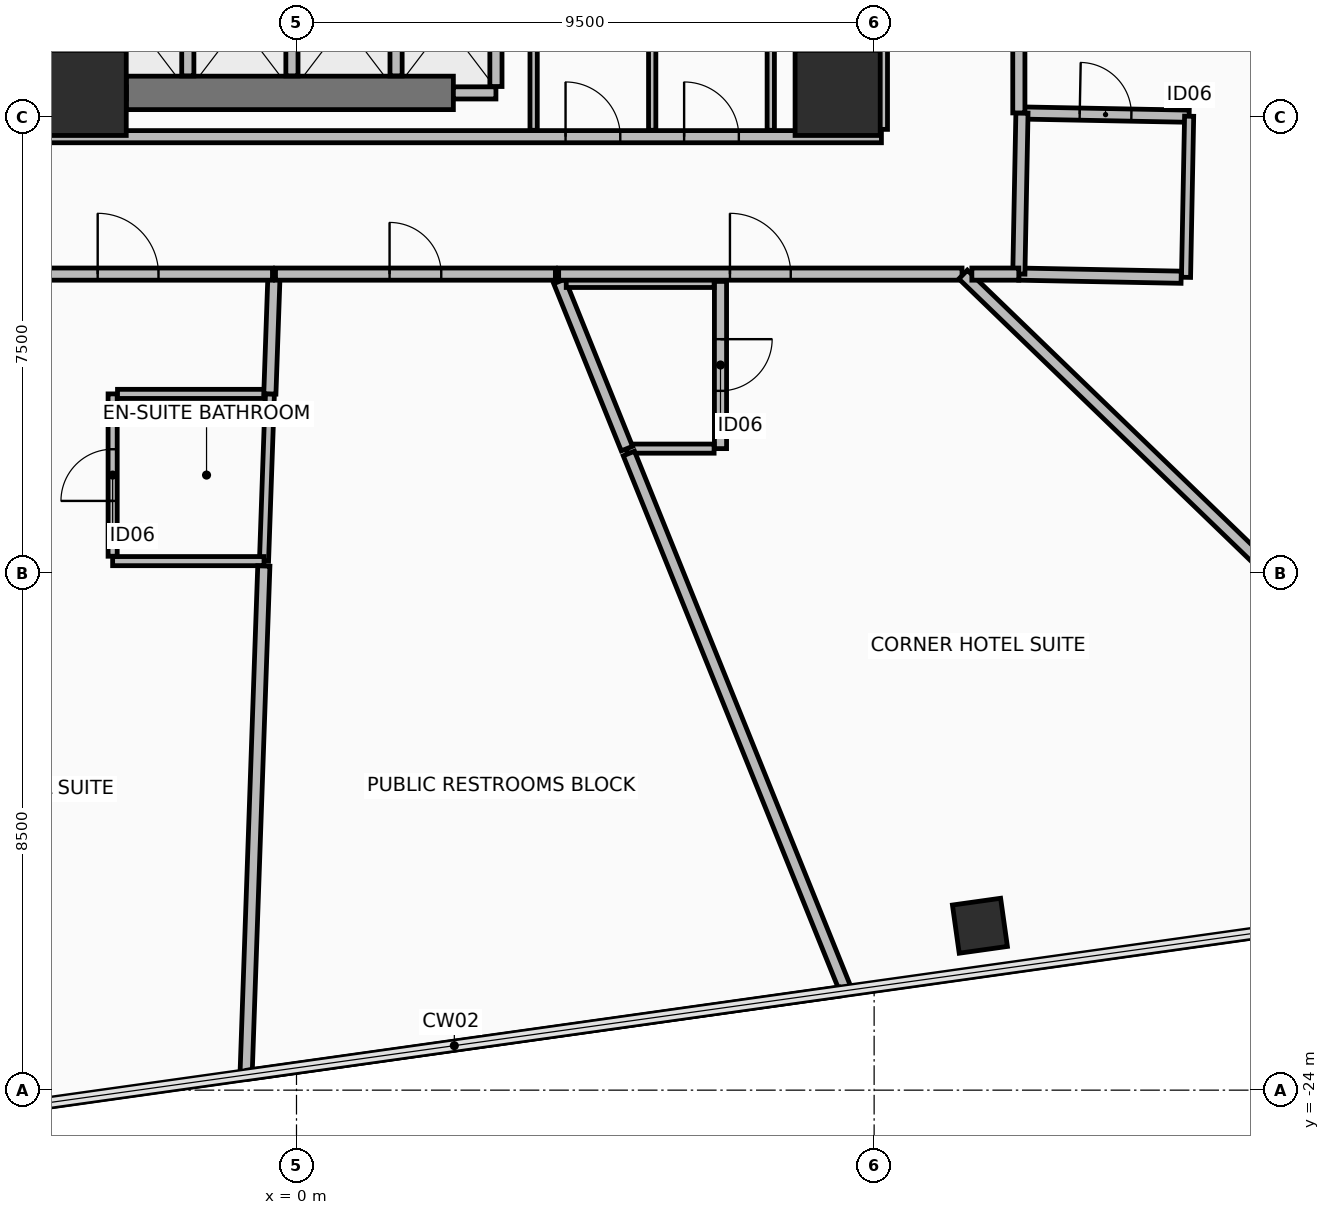
"""IFC4 building model, lengths in metres.
Left out: names, types, materials, properties, quantities, classifications, styles, units other than length and angle.
Written with IfcOpenShell. Run it as: python <this file> out.ifc"""

import sys

from ifc_helpers import new_model, si_unit, direction, frame, frame_2d, origin, origin_2d, place, context, subcontext, project, spatial, rectangle, hollow_rectangle, extrude, element, fill, save


model = new_model("IFC4")
c1 = context("Model", 3, precision=1e-05, world=origin(), true_north=direction((0.0, 1.0)))
c2 = subcontext(c1, "Body", "Model", "MODEL_VIEW")
j1 = project(units=[si_unit("LENGTHUNIT", "METRE"), si_unit("PLANEANGLEUNIT", "RADIAN")], contexts=[c1])
p1 = place(None, origin())
s1 = spatial("IfcSite", under=j1, at=p1, CompositionType="ELEMENT")
p2 = place(p1, origin())
s2 = spatial("IfcBuilding", under=s1, at=p2, CompositionType="ELEMENT")
p3 = place(p2, frame((0.0, 0.0, 70.75)))
s3 = spatial("IfcBuildingStorey", under=s2, at=p3, CompositionType="ELEMENT", Elevation=70.75)
for number, where, z_axis, x_axis in (
    (1, (-3.5, -7.6, 0.0), (0.0, 0.0, 1.0), (1.0, 0.0, 0.0)),
    (2, (8.9, -7.6, 0.0), (0.0, 0.0, 1.0), (1.0, 0.0, 0.0)),
):
    element("IfcColumn", number, at=place(p3, frame(where, z_axis=z_axis, x_axis=x_axis)), inside=s3, PredefinedType="COLUMN", context=c2, shape_type="SweptSolid", body=[
        extrude(rectangle(XDim=1.4, YDim=1.4, at=origin_2d()), origin(), (0.0, 0.0, 1.0), 3.45),
    ])
p4 = place(p3, frame((11.24, -21.296, 0.0), z_axis=(0.0, 0.0, 1.0), x_axis=(0.990268068742, 0.13917310096, 0.0)))
e3 = element("IfcColumn", 3, at=p4, inside=s3, PredefinedType="COLUMN", context=c2, shape_type="SweptSolid", body=[
    extrude(hollow_rectangle(XDim=0.8, YDim=0.8, WallThickness=0.045, at=origin_2d()), origin(), (0.0, 0.0, 1.0), 3.45),
])
p5 = place(p3, frame((-2.8, -7.6, 0.0), z_axis=(0.0, 0.0, 1.0), x_axis=(1.0, 0.0, 0.0)))
e4 = element("IfcWall", 4, at=p5, inside=s3, PredefinedType="SHEAR", context=c2, shape_type="SweptSolid", body=[
    extrude(rectangle(XDim=5.38, YDim=0.55, at=frame_2d((2.69, 0.0))), origin(), (0.0, 0.0, 1.0), 3.275),
])
p6 = place(p3, frame((-9.62, -8.32, 0.0), z_axis=(0.0, 0.0, 1.0), x_axis=(1.0, 0.0, 0.0)))
e5 = element("IfcWall", 5, at=p6, inside=s3, PredefinedType="PARTITIONING", context=c2, shape_type="SweptSolid", body=[
    extrude(rectangle(XDim=19.24, YDim=0.2, at=frame_2d((9.62, 0.0))), origin(), (0.0, 0.0, 1.0), 2.67),
])
p7 = place(p6, frame((14.045, 0.0, 0.0)))
e6 = element("IfcOpeningElement", 6, at=p7, cuts=e5, PredefinedType="OPENING", context=c2, shape_type="SweptSolid", body=[
    extrude(rectangle(XDim=0.9, YDim=2.1, at=frame_2d((0.45, 1.05))), frame((0.0, 0.11, 0.0), z_axis=(0.0, -1.0, 0.0), x_axis=(1.0, 0.0, 0.0)), (0.0, 0.0, 1.0), 0.22),
])
p8 = place(p6, frame((15.995, 0.0, 0.0)))
e7 = element("IfcOpeningElement", 7, at=p8, cuts=e5, PredefinedType="OPENING", context=c2, shape_type="SweptSolid", body=[
    extrude(rectangle(XDim=0.9, YDim=2.1, at=frame_2d((0.45, 1.05))), frame((0.0, 0.11, 0.0), z_axis=(0.0, -1.0, 0.0), x_axis=(1.0, 0.0, 0.0)), (0.0, 0.0, 1.0), 0.22),
])
p9 = place(p3, frame((9.62, -8.2, 0.0), z_axis=(0.0, 0.0, 1.0), x_axis=(0.0, 1.0, 0.0)))
e8 = element("IfcWall", 8, at=p9, inside=s3, PredefinedType="PARTITIONING", context=c2, shape_type="SweptSolid", body=[
    extrude(rectangle(XDim=16.4, YDim=0.2, at=frame_2d((8.2, 0.0))), origin(), (0.0, 0.0, 1.0), 2.67),
])
p10 = place(p9, frame((12.65, 0.0, 0.0)))
e9 = element("IfcOpeningElement", 9, at=p10, cuts=e8, PredefinedType="OPENING", context=c2, shape_type="SweptSolid", body=[
    extrude(rectangle(XDim=1.1, YDim=2.15, at=frame_2d((0.55, 1.075))), frame((0.0, 0.11, 0.0), z_axis=(0.0, -1.0, 0.0), x_axis=(1.0, 0.0, 0.0)), (0.0, 0.0, 1.0), 0.22),
])
p11 = place(p3, frame((-3.5, -7.6, 0.0), z_axis=(0.0, 0.0, 1.0), x_axis=(1.0, 0.0, 0.0)))
e10 = element("IfcWall", 10, at=p11, inside=s3, PredefinedType="PARTITIONING", context=c2, shape_type="SweptSolid", body=[
    extrude(rectangle(XDim=0.7, YDim=0.2, at=frame_2d((0.35, 0.0))), origin(), (0.0, 0.0, 1.0), 2.47),
])
p12 = place(p3, frame((-3.5, -7.495, 0.0), z_axis=(0.0, 0.0, 1.0), x_axis=(0.0, 1.0, 0.0)))
e11 = element("IfcWall", 11, at=p12, inside=s3, PredefinedType="PARTITIONING", context=c2, shape_type="SweptSolid", body=[
    extrude(rectangle(XDim=2.065, YDim=0.2, at=frame_2d((1.033, 0.0))), origin(), (0.0, 0.0, 1.0), 2.47),
])
for number, where, z_axis, x_axis in (
    (12, (-1.788, -7.32, 0.0), (0.0, 0.0, 1.0), (0.0, 1.0, 0.0)),
    (13, (-0.075, -7.32, 0.0), (0.0, 0.0, 1.0), (0.0, 1.0, 0.0)),
    (14, (1.637, -7.32, 0.0), (0.0, 0.0, 1.0), (0.0, 1.0, 0.0)),
):
    element("IfcWall", number, at=place(p3, frame(where, z_axis=z_axis, x_axis=x_axis)), inside=s3, PredefinedType="PARTITIONING", context=c2, shape_type="SweptSolid", body=[
        extrude(rectangle(XDim=1.89, YDim=0.2, at=frame_2d((0.945, 0.0))), origin(), (0.0, 0.0, 1.0), 3.275),
    ])
p13 = place(p3, frame((2.58, -7.6, 0.0), z_axis=(0.0, 0.0, 1.0), x_axis=(1.0, 0.0, 0.0)))
e15 = element("IfcWall", 15, at=p13, inside=s3, PredefinedType="PARTITIONING", context=c2, shape_type="SweptSolid", body=[
    extrude(rectangle(XDim=0.7, YDim=0.2, at=frame_2d((0.35, 0.0))), origin(), (0.0, 0.0, 1.0), 2.47),
])
p14 = place(p3, frame((3.28, -7.495, 0.0), z_axis=(0.0, 0.0, 1.0), x_axis=(0.0, 1.0, 0.0)))
e16 = element("IfcWall", 16, at=p14, inside=s3, PredefinedType="PARTITIONING", context=c2, shape_type="SweptSolid", body=[
    extrude(rectangle(XDim=2.065, YDim=0.2, at=frame_2d((1.033, 0.0))), origin(), (0.0, 0.0, 1.0), 2.47),
])
p15 = place(p3, frame((5.85, -8.215, 0.0), z_axis=(0.0, 0.0, 1.0), x_axis=(0.0, 1.0, 0.0)))
e17 = element("IfcWall", 17, at=p15, inside=s3, PredefinedType="PARTITIONING", context=c2, shape_type="SweptSolid", body=[
    extrude(rectangle(XDim=3.515, YDim=0.12, at=frame_2d((1.758, 0.0))), origin(), (0.0, 0.0, 1.0), 2.47),
])
p16 = place(p3, frame((3.9, -4.765, 0.0), z_axis=(0.0, 0.0, 1.0), x_axis=(0.0, -1.0, 0.0)))
e18 = element("IfcWall", 18, at=p16, inside=s3, PredefinedType="PARTITIONING", context=c2, shape_type="SweptSolid", body=[
    extrude(rectangle(XDim=3.45, YDim=0.12, at=frame_2d((1.725, 0.0))), origin(), (0.0, 0.0, 1.0), 2.47),
])
p17 = place(p3, frame((7.8, -8.215, 0.0), z_axis=(0.0, 0.0, 1.0), x_axis=(0.0, 1.0, 0.0)))
e19 = element("IfcWall", 19, at=p17, inside=s3, PredefinedType="PARTITIONING", context=c2, shape_type="SweptSolid", body=[
    extrude(rectangle(XDim=3.515, YDim=0.12, at=frame_2d((1.758, 0.0))), origin(), (0.0, 0.0, 1.0), 2.47),
])
p18 = place(p3, frame((-0.438, -12.55, 0.0), z_axis=(0.0, 0.0, 1.0), x_axis=(-0.034868698287, -0.999391902048, 0.0)))
e20 = element("IfcWall", 20, at=p18, inside=s3, PredefinedType="PARTITIONING", context=c2, shape_type="SweptSolid", body=[
    extrude(rectangle(XDim=2.752, YDim=0.15, at=frame_2d((1.376, 0.0))), origin(), (0.0, 0.0, 1.0), 3.275),
])
p19 = place(p3, frame((-0.534, -15.3, 0.0), z_axis=(0.0, 0.0, 1.0), x_axis=(-1.0, 0.0, 0.0)))
e21 = element("IfcWall", 21, at=p19, inside=s3, PredefinedType="PARTITIONING", context=c2, shape_type="SweptSolid", body=[
    extrude(rectangle(XDim=2.49, YDim=0.15, at=frame_2d((1.245, 0.0))), origin(), (0.0, 0.0, 1.0), 3.275),
])
p20 = place(p3, frame((-3.024, -15.22, 0.0), z_axis=(0.0, 0.0, 1.0), x_axis=(0.0, 1.0, 0.0)))
e22 = element("IfcWall", 22, at=p20, inside=s3, PredefinedType="PARTITIONING", context=c2, shape_type="SweptSolid", body=[
    extrude(rectangle(XDim=2.67, YDim=0.15, at=frame_2d((1.335, 0.0))), origin(), (0.0, 0.0, 1.0), 3.275),
])
p21 = place(p20, frame((0.91, 0.0, 0.0)))
e23 = element("IfcOpeningElement", 23, at=p21, cuts=e22, PredefinedType="OPENING", context=c2, shape_type="SweptSolid", body=[
    extrude(rectangle(XDim=0.85, YDim=2.1, at=frame_2d((0.425, 1.05))), frame((0.0, 0.085, 0.0), z_axis=(0.0, -1.0, 0.0), x_axis=(1.0, 0.0, 0.0)), (0.0, 0.0, 1.0), 0.17),
])
p22 = place(p3, frame((-2.944, -12.55, 0.0), z_axis=(0.0, 0.0, 1.0), x_axis=(1.0, 0.0, 0.0)))
e24 = element("IfcWall", 24, at=p22, inside=s3, PredefinedType="PARTITIONING", context=c2, shape_type="SweptSolid", body=[
    extrude(rectangle(XDim=2.425, YDim=0.15, at=frame_2d((1.213, 0.0))), origin(), (0.0, 0.0, 1.0), 3.275),
])
p23 = place(p3, frame((6.973, -10.7, 0.0), z_axis=(0.0, 0.0, 1.0), x_axis=(0.0, -1.0, 0.0)))
e25 = element("IfcWall", 25, at=p23, inside=s3, PredefinedType="PARTITIONING", context=c2, shape_type="SweptSolid", body=[
    extrude(rectangle(XDim=2.75, YDim=0.2, at=frame_2d((1.375, 0.0))), origin(), (0.0, 0.0, 1.0), 3.275),
])
p24 = place(p23, frame((0.95, 0.0, 0.0)))
e26 = element("IfcOpeningElement", 26, at=p24, cuts=e25, PredefinedType="OPENING", context=c2, shape_type="SweptSolid", body=[
    extrude(rectangle(XDim=0.85, YDim=2.1, at=frame_2d((0.425, 1.05))), frame((0.0, 0.11, 0.0), z_axis=(0.0, -1.0, 0.0), x_axis=(1.0, 0.0, 0.0)), (0.0, 0.0, 1.0), 0.22),
])
p25 = place(p3, frame((6.868, -13.45, 0.0), z_axis=(0.0, 0.0, 1.0), x_axis=(-1.0, 0.0, 0.0)))
e27 = element("IfcWall", 27, at=p25, inside=s3, PredefinedType="PARTITIONING", context=c2, shape_type="SweptSolid", body=[
    extrude(rectangle(XDim=1.434, YDim=0.15, at=frame_2d((0.717, 0.0))), origin(), (0.0, 0.0, 1.0), 3.275),
])
p26 = place(p3, frame((5.434, -13.45, 0.0), z_axis=(0.0, 0.0, 1.0), x_axis=(-0.374610031927, 0.927182465311, 0.0)))
e28 = element("IfcWall", 28, at=p26, inside=s3, PredefinedType="PARTITIONING", context=c2, shape_type="SweptSolid", body=[
    extrude(rectangle(XDim=2.966, YDim=0.2, at=frame_2d((1.483, 0.0))), origin(), (0.0, 0.0, 1.0), 3.275),
])
p27 = place(p3, frame((4.436, -10.7, 0.0), z_axis=(0.0, 0.0, 1.0), x_axis=(1.0, 0.0, 0.0)))
e29 = element("IfcWall", 29, at=p27, inside=s3, PredefinedType="PARTITIONING", context=c2, shape_type="SweptSolid", body=[
    extrude(rectangle(XDim=2.432, YDim=0.2, at=frame_2d((1.216, 0.0))), origin(), (0.0, 0.0, 1.0), 3.275),
])
p28 = place(p3, frame((11.931, -7.93, 0.0), z_axis=(0.0, 0.0, 1.0), x_axis=(0.999812703389, -0.019353504647, 0.0)))
e30 = element("IfcWall", 30, at=p28, inside=s3, PredefinedType="PARTITIONING", context=c2, shape_type="SweptSolid", body=[
    extrude(rectangle(XDim=2.75, YDim=0.2, at=frame_2d((1.375, 0.0))), origin(), (0.0, 0.0, 1.0), 3.275),
])
p29 = place(p28, frame((0.95, 0.0, 0.0)))
e31 = element("IfcOpeningElement", 31, at=p29, cuts=e30, PredefinedType="OPENING", context=c2, shape_type="SweptSolid", body=[
    extrude(rectangle(XDim=0.85, YDim=2.1, at=frame_2d((0.425, 1.05))), frame((0.0, 0.11, 0.0), z_axis=(0.0, -1.0, 0.0), x_axis=(1.0, 0.0, 0.0)), (0.0, 0.0, 1.0), 0.22),
])
p30 = place(p3, frame((14.681, -7.984, 0.0), z_axis=(0.0, 0.0, 1.0), x_axis=(-0.01934764942, -0.999812816712, 0.0)))
e32 = element("IfcWall", 32, at=p30, inside=s3, PredefinedType="PARTITIONING", context=c2, shape_type="SweptSolid", body=[
    extrude(rectangle(XDim=2.65, YDim=0.15, at=frame_2d((1.325, 0.0))), origin(), (0.0, 0.0, 1.0), 2.67),
])
p31 = place(p3, frame((14.55, -10.632, 0.0), z_axis=(0.0, 0.0, 1.0), x_axis=(-0.999813887268, 0.019292247848, 0.0)))
e33 = element("IfcWall", 33, at=p31, inside=s3, PredefinedType="PARTITIONING", context=c2, shape_type="SweptSolid", body=[
    extrude(rectangle(XDim=2.67, YDim=0.2, at=frame_2d((1.335, 0.0))), origin(), (0.0, 0.0, 1.0), 2.67),
])
p32 = place(p3, frame((11.88, -10.579, 0.0), z_axis=(0.0, 0.0, 1.0), x_axis=(0.019356564513, 0.999812644154, 0.0)))
e34 = element("IfcWall", 34, at=p32, inside=s3, PredefinedType="PARTITIONING", context=c2, shape_type="SweptSolid", body=[
    extrude(rectangle(XDim=2.649, YDim=0.2, at=frame_2d((1.324, 0.0))), origin(), (0.0, 0.0, 1.0), 2.67),
])
p33 = place(p3, frame((-0.828, -23.72, 0.0), z_axis=(0.0, 0.0, 1.0), x_axis=(0.034900568233, 0.9993907896, 0.0)))
e35 = element("IfcWall", 35, at=p33, inside=s3, PredefinedType="PARTITIONING", context=c2, shape_type="SweptSolid", body=[
    extrude(rectangle(XDim=8.345, YDim=0.2, at=frame_2d((4.173, 0.0))), origin(), (0.0, 0.0, 1.0), 2.47),
])
p34 = place(p3, frame((-0.438, -12.55, 0.0), z_axis=(0.0, 0.0, 1.0), x_axis=(0.034855235143, 0.999392371685, 0.0)))
e36 = element("IfcWall", 36, at=p34, inside=s3, PredefinedType="PARTITIONING", context=c2, shape_type="SweptSolid", body=[
    extrude(rectangle(XDim=1.947, YDim=0.2, at=frame_2d((0.974, 0.0))), origin(), (0.0, 0.0, 1.0), 3.275),
])
p35 = place(p3, frame((-0.345, -10.58, 0.0), z_axis=(0.0, 0.0, 1.0), x_axis=(1.0, 0.0, 0.0)))
e37 = element("IfcWall", 37, at=p35, inside=s3, PredefinedType="PARTITIONING", context=c2, shape_type="SweptSolid", body=[
    extrude(rectangle(XDim=4.603, YDim=0.2, at=frame_2d((2.302, 0.0))), origin(), (0.0, 0.0, 1.0), 3.275),
])
p36 = place(p35, frame((1.876, 0.0, 0.0)))
e38 = element("IfcOpeningElement", 38, at=p36, cuts=e37, PredefinedType="OPENING", context=c2, shape_type="SweptSolid", body=[
    extrude(rectangle(XDim=0.85, YDim=2.1, at=frame_2d((0.425, 1.05))), frame((0.0, 0.11, 0.0), z_axis=(0.0, -1.0, 0.0), x_axis=(1.0, 0.0, 0.0)), (0.0, 0.0, 1.0), 0.22),
])
p37 = place(p3, frame((5.467, -13.53, 0.0), z_axis=(0.0, 0.0, 1.0), x_axis=(0.374604987926, -0.927184503225, 0.0)))
e39 = element("IfcWall", 39, at=p37, inside=s3, PredefinedType="PARTITIONING", context=c2, shape_type="SweptSolid", body=[
    extrude(rectangle(XDim=9.527, YDim=0.2, at=frame_2d((4.763, 0.0))), origin(), (0.0, 0.0, 1.0), 2.47),
])
p38 = place(p3, frame((8.928, -22.378, 0.0), z_axis=(0.0, 0.0, 1.0), x_axis=(-0.990268034831, -0.139173342244, 0.0)))
e40 = element("IfcWall", 40, at=p38, inside=s3, PredefinedType="PARTITIONING", context=c2, shape_type="SweptSolid", body=[
    extrude(rectangle(XDim=9.824, YDim=0.15, at=frame_2d((4.912, 0.0))), origin(), (0.0, 0.0, 1.0), 3.275),
])
p39 = place(p3, frame((-5.145, -10.58, 0.0), z_axis=(0.0, 0.0, 1.0), x_axis=(1.0, 0.0, 0.0)))
e41 = element("IfcWall", 41, at=p39, inside=s3, PredefinedType="PARTITIONING", context=c2, shape_type="SweptSolid", body=[
    extrude(rectangle(XDim=4.749, YDim=0.2, at=frame_2d((2.375, 0.0))), origin(), (0.0, 0.0, 1.0), 3.275),
])
p40 = place(p39, frame((1.875, 0.0, 0.0)))
e42 = element("IfcOpeningElement", 42, at=p40, cuts=e41, PredefinedType="OPENING", context=c2, shape_type="SweptSolid", body=[
    extrude(rectangle(XDim=1.0, YDim=2.15, at=frame_2d((0.5, 1.075))), frame((0.0, 0.11, 0.0), z_axis=(0.0, -1.0, 0.0), x_axis=(1.0, 0.0, 0.0)), (0.0, 0.0, 1.0), 0.22),
])
p41 = place(p3, frame((4.312, -10.58, 0.0), z_axis=(0.0, 0.0, 1.0), x_axis=(1.0, 0.0, 0.0)))
e43 = element("IfcWall", 43, at=p41, inside=s3, PredefinedType="PARTITIONING", context=c2, shape_type="SweptSolid", body=[
    extrude(rectangle(XDim=6.634, YDim=0.2, at=frame_2d((3.317, 0.0))), origin(), (0.0, 0.0, 1.0), 2.67),
])
p42 = place(p41, frame((2.817, 0.0, 0.0)))
e44 = element("IfcOpeningElement", 44, at=p42, cuts=e43, PredefinedType="OPENING", context=c2, shape_type="SweptSolid", body=[
    extrude(rectangle(XDim=1.0, YDim=2.15, at=frame_2d((0.5, 1.075))), frame((0.0, 0.11, 0.0), z_axis=(0.0, -1.0, 0.0), x_axis=(1.0, 0.0, 0.0)), (0.0, 0.0, 1.0), 0.22),
])
p43 = place(p3, frame((10.963, -10.587, 0.0), z_axis=(0.0, 0.0, 1.0), x_axis=(0.719333957275, -0.694664421077, 0.0)))
e45 = element("IfcWall", 45, at=p43, inside=s3, PredefinedType="PARTITIONING", context=c2, shape_type="SweptSolid", body=[
    extrude(rectangle(XDim=14.459, YDim=0.2, at=frame_2d((7.229, 0.0))), origin(), (0.0, 0.0, 1.0), 2.47),
])
p44 = place(p3, frame((11.107, -10.58, 0.0), z_axis=(0.0, 0.0, 1.0), x_axis=(1.0, 0.0, 0.0)))
e46 = element("IfcWall", 46, at=p44, inside=s3, PredefinedType="PARTITIONING", context=c2, shape_type="SweptSolid", body=[
    extrude(rectangle(XDim=0.772, YDim=0.2, at=frame_2d((0.386, 0.0))), origin(), (0.0, 0.0, 1.0), 3.275),
])
p45 = place(p3, frame((11.88, -7.929, 0.0), z_axis=(0.0, 0.0, 1.0), x_axis=(0.0, 1.0, 0.0)))
e47 = element("IfcWall", 47, at=p45, inside=s3, PredefinedType="PARTITIONING", context=c2, shape_type="SweptSolid", body=[
    extrude(rectangle(XDim=3.494, YDim=0.2, at=frame_2d((1.747, 0.0))), origin(), (0.0, 0.0, 1.0), 2.67),
])
p46 = place(p45, frame((1.247, 0.0, 0.0)))
e48 = element("IfcOpeningElement", 48, at=p46, cuts=e47, PredefinedType="OPENING", context=c2, shape_type="SweptSolid", body=[
    extrude(rectangle(XDim=1.0, YDim=2.15, at=frame_2d((0.5, 1.075))), frame((0.0, 0.11, 0.0), z_axis=(0.0, -1.0, 0.0), x_axis=(1.0, 0.0, 0.0)), (0.0, 0.0, 1.0), 0.22),
])
p47 = place(p7, origin())
e49 = element("IfcDoor", 49, at=p47, inside=s3, OperationType="SINGLE_SWING_LEFT", PredefinedType="DOOR", context=c2, shape_type="SweptSolid", body=[
    extrude(rectangle(XDim=0.9, YDim=2.1, at=frame_2d((0.45, 1.05))), frame((0.0, 0.025, 0.0), z_axis=(0.0, -1.0, 0.0), x_axis=(1.0, 0.0, 0.0)), (0.0, 0.0, 1.0), 0.05),
])
fill(e6, e49)
p48 = place(p8, origin())
e50 = element("IfcDoor", 50, at=p48, inside=s3, OperationType="SINGLE_SWING_LEFT", PredefinedType="DOOR", context=c2, shape_type="SweptSolid", body=[
    extrude(rectangle(XDim=0.9, YDim=2.1, at=frame_2d((0.45, 1.05))), frame((0.0, 0.025, 0.0), z_axis=(0.0, -1.0, 0.0), x_axis=(1.0, 0.0, 0.0)), (0.0, 0.0, 1.0), 0.05),
])
fill(e7, e50)
p49 = place(p21, origin())
e51 = element("IfcDoor", 51, at=p49, inside=s3, OperationType="SINGLE_SWING_RIGHT", PredefinedType="DOOR", context=c2, shape_type="SweptSolid", body=[
    extrude(rectangle(XDim=0.85, YDim=2.1, at=frame_2d((0.425, 1.05))), frame((0.0, 0.025, 0.0), z_axis=(0.0, -1.0, 0.0), x_axis=(1.0, 0.0, 0.0)), (0.0, 0.0, 1.0), 0.05),
])
fill(e23, e51)
p50 = place(p24, origin())
e52 = element("IfcDoor", 52, at=p50, inside=s3, OperationType="SINGLE_SWING_RIGHT", PredefinedType="DOOR", context=c2, shape_type="SweptSolid", body=[
    extrude(rectangle(XDim=0.85, YDim=2.1, at=frame_2d((0.425, 1.05))), frame((0.0, 0.025, 0.0), z_axis=(0.0, -1.0, 0.0), x_axis=(1.0, 0.0, 0.0)), (0.0, 0.0, 1.0), 0.05),
])
fill(e26, e52)
p51 = place(p29, origin())
e53 = element("IfcDoor", 53, at=p51, inside=s3, OperationType="SINGLE_SWING_RIGHT", PredefinedType="DOOR", context=c2, shape_type="SweptSolid", body=[
    extrude(rectangle(XDim=0.85, YDim=2.1, at=frame_2d((0.425, 1.05))), frame((0.0, 0.025, 0.0), z_axis=(0.0, -1.0, 0.0), x_axis=(1.0, 0.0, 0.0)), (0.0, 0.0, 1.0), 0.05),
])
fill(e31, e53)
p52 = place(p36, origin())
e54 = element("IfcDoor", 54, at=p52, inside=s3, OperationType="SINGLE_SWING_RIGHT", PredefinedType="DOOR", context=c2, shape_type="SweptSolid", body=[
    extrude(rectangle(XDim=0.85, YDim=2.1, at=frame_2d((0.425, 1.05))), frame((0.0, 0.025, 0.0), z_axis=(0.0, -1.0, 0.0), x_axis=(1.0, 0.0, 0.0)), (0.0, 0.0, 1.0), 0.05),
])
fill(e38, e54)
p53 = place(p40, origin())
e55 = element("IfcDoor", 55, at=p53, inside=s3, OperationType="SINGLE_SWING_LEFT", PredefinedType="DOOR", context=c2, shape_type="SweptSolid", body=[
    extrude(rectangle(XDim=1.0, YDim=2.15, at=frame_2d((0.5, 1.075))), frame((0.0, 0.025, 0.0), z_axis=(0.0, -1.0, 0.0), x_axis=(1.0, 0.0, 0.0)), (0.0, 0.0, 1.0), 0.05),
])
fill(e42, e55)
p54 = place(p42, origin())
e56 = element("IfcDoor", 56, at=p54, inside=s3, OperationType="SINGLE_SWING_LEFT", PredefinedType="DOOR", context=c2, shape_type="SweptSolid", body=[
    extrude(rectangle(XDim=1.0, YDim=2.15, at=frame_2d((0.5, 1.075))), frame((0.0, 0.025, 0.0), z_axis=(0.0, -1.0, 0.0), x_axis=(1.0, 0.0, 0.0)), (0.0, 0.0, 1.0), 0.05),
])
fill(e44, e56)
save(model, sys.argv[1])
